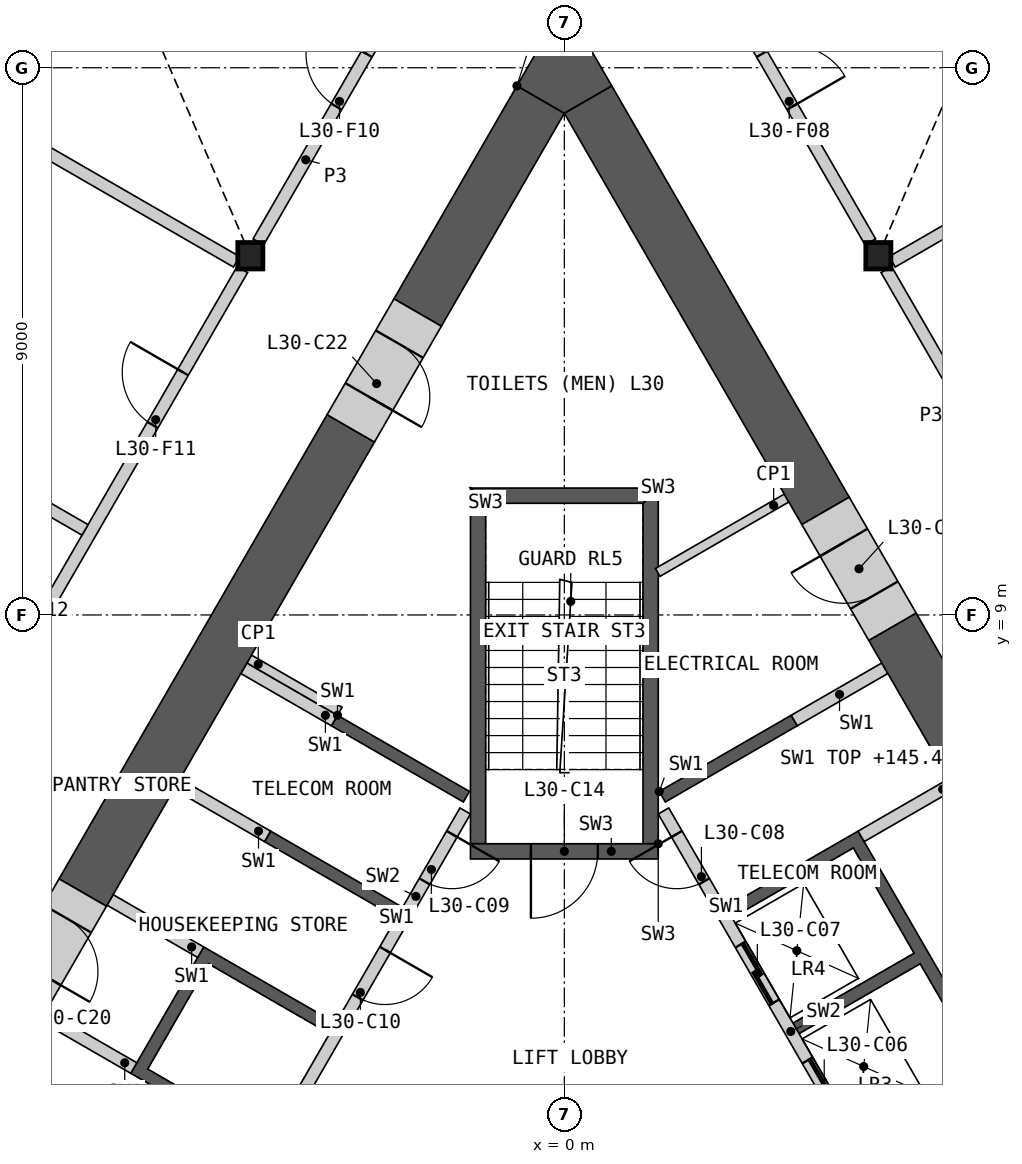
"""IFC4 building model, lengths in metres.
Left out: names, types, materials, properties, quantities, classifications, styles, units other than length and angle.
Written with IfcOpenShell. Run it as: python <this file> out.ifc"""

import sys

from ifc_helpers import new_model, si_unit, direction, frame, frame_2d, origin, origin_2d, place, context, subcontext, project, spatial, polyline, rectangle, i_section, outline, extrude, element, fill, save


model = new_model("IFC4")
c1 = context("Model", 3, precision=1e-05, world=origin(), true_north=direction((0.0, 1.0)))
c2 = subcontext(c1, "Body", "Model", "MODEL_VIEW")
j1 = project(units=[si_unit("LENGTHUNIT", "METRE"), si_unit("PLANEANGLEUNIT", "RADIAN")], contexts=[c1])
p1 = place(None, origin())
s1 = spatial("IfcSite", under=j1, at=p1, CompositionType="ELEMENT")
p2 = place(p1, origin())
s2 = spatial("IfcBuilding", under=s1, at=p2, CompositionType="ELEMENT")
p3 = place(p2, frame((0.0, 0.0, 141.6)))
s3 = spatial("IfcBuildingStorey", under=s2, at=p3, CompositionType="ELEMENT", Elevation=141.6)
for number, where, z_axis, x_axis in (
    (1, (-5.164, 14.908, 0.0), (0.0, 0.0, 1.0), (1.0, 0.0, 0.0)),
    (2, (5.164, 14.908, 0.0), (0.0, 0.0, 1.0), (1.0, 0.0, 0.0)),
):
    element("IfcColumn", number, at=place(p3, frame(where, z_axis=z_axis, x_axis=x_axis)), inside=s3, PredefinedType="COLUMN", context=c2, shape_type="SweptSolid", body=[
        extrude(i_section(OverallWidth=0.412, OverallDepth=0.435, WebThickness=0.036, FlangeThickness=0.057, at=origin_2d()), origin(), (0.0, 0.0, 1.0), 4.2),
    ])
p4 = place(p3, origin())
e3 = element("IfcWall", 3, at=p4, inside=s3, PredefinedType="SHEAR", context=c2, shape_type="SweptSolid", body=[
    extrude(outline(polyline([(1.561, 6.097), (3.731, 7.35), (3.831, 7.177), (1.66, 5.924), (1.561, 6.097)])), origin(), (0.0, 0.0, 1.0), 3.8),
])
p5 = place(p3, origin())
e4 = element("IfcWall", 4, at=p5, inside=s3, PredefinedType="SHEAR", context=c2, shape_type="SweptSolid", body=[
    extrude(outline(polyline([(2.66, 4.192), (4.831, 5.445), (8.231, -0.444), (6.061, -1.697), (5.96, -1.524), (7.952, -0.374), (6.952, 1.358), (4.96, 0.208), (4.861, 0.381), (6.852, 1.531), (5.852, 3.263), (3.861, 2.113), (3.76, 2.287), (5.752, 3.437), (4.752, 5.169), (2.76, 4.019), (2.66, 4.192)])), origin(), (0.0, 0.0, 1.0), 3.8),
])
p6 = place(p3, frame((5.817, -1.476, 0.0), z_axis=(0.0, 0.0, 1.0), x_axis=(-0.500002616675, 0.866023893041, 0.0)))
e5 = element("IfcWall", 5, at=p6, inside=s3, PredefinedType="SOLIDWALL", context=c2, shape_type="SweptSolid", body=[
    extrude(rectangle(XDim=8.373, YDim=0.2, at=frame_2d((4.187, 0.0))), origin(), (0.0, 0.0, 1.0), 3.8),
])
p7 = place(p6, frame((0.337, 0.0, 0.0)))
e6 = element("IfcOpeningElement", 6, at=p7, cuts=e5, PredefinedType="OPENING", context=c2, shape_type="SweptSolid", body=[
    extrude(rectangle(XDim=1.1, YDim=2.1, at=frame_2d((0.55, 1.05))), frame((0.0, 0.11, 0.0), z_axis=(0.0, -1.0, 0.0), x_axis=(1.0, 0.0, 0.0)), (0.0, 0.0, 1.0), 0.22),
])
p8 = place(p6, frame((2.537, 0.0, 0.0)))
e7 = element("IfcOpeningElement", 7, at=p8, cuts=e5, PredefinedType="OPENING", context=c2, shape_type="SweptSolid", body=[
    extrude(rectangle(XDim=1.1, YDim=2.1, at=frame_2d((0.55, 1.05))), frame((0.0, 0.11, 0.0), z_axis=(0.0, -1.0, 0.0), x_axis=(1.0, 0.0, 0.0)), (0.0, 0.0, 1.0), 0.22),
])
p9 = place(p6, frame((4.737, 0.0, 0.0)))
e8 = element("IfcOpeningElement", 8, at=p9, cuts=e5, PredefinedType="OPENING", context=c2, shape_type="SweptSolid", body=[
    extrude(rectangle(XDim=1.1, YDim=2.1, at=frame_2d((0.55, 1.05))), frame((0.0, 0.11, 0.0), z_axis=(0.0, -1.0, 0.0), x_axis=(1.0, 0.0, 0.0)), (0.0, 0.0, 1.0), 0.22),
])
p10 = place(p6, frame((7.037, 0.0, 0.0)))
e9 = element("IfcOpeningElement", 9, at=p10, cuts=e5, PredefinedType="OPENING", context=c2, shape_type="SweptSolid", body=[
    extrude(rectangle(XDim=0.9, YDim=2.1, at=frame_2d((0.45, 1.05))), frame((0.0, 0.11, 0.0), z_axis=(0.0, -1.0, 0.0), x_axis=(1.0, 0.0, 0.0)), (0.0, 0.0, 1.0), 0.22),
])
for number, where, z_axis, x_axis in (
    (10, (4.881, 5.358, 0.0), (0.0, 0.0, 1.0), (0.866, 0.5, 0.0)),
    (11, (3.781, 7.263, 0.0), (0.0, 0.0, 1.0), (0.866, 0.5, 0.0)),
):
    element("IfcWall", number, at=place(p3, frame(where, z_axis=z_axis, x_axis=x_axis)), inside=s3, PredefinedType="SHEAR", context=c2, shape_type="SweptSolid", body=[
        extrude(rectangle(XDim=1.72, YDim=0.2, at=frame_2d((0.86, 0.0))), origin(), (0.0, 0.0, 1.0), 3.8),
    ])
p11 = place(p3, origin())
e12 = element("IfcWall", 12, at=p11, inside=s3, PredefinedType="SHEAR", context=c2, shape_type="SweptSolid", body=[
    extrude(outline(polyline([(-4.96, 0.208), (-7.131, 1.461), (-5.931, 3.54), (-3.76, 2.287), (-3.861, 2.113), (-5.852, 3.263), (-6.852, 1.531), (-4.861, 0.381), (-4.96, 0.208)])), origin(), (0.0, 0.0, 1.0), 3.8),
])
p12 = place(p3, origin())
e13 = element("IfcWall", 13, at=p12, inside=s3, PredefinedType="SHEAR", context=c2, shape_type="SweptSolid", body=[
    extrude(outline(polyline([(-2.76, 4.019), (-4.931, 5.272), (-4.831, 5.445), (-2.66, 4.192), (-2.76, 4.019)])), origin(), (0.0, 0.0, 1.0), 3.8),
])
p13 = place(p3, origin())
e14 = element("IfcWall", 14, at=p13, inside=s3, PredefinedType="SHEAR", context=c2, shape_type="SweptSolid", body=[
    extrude(outline(polyline([(-3.731, 7.35), (-1.561, 6.097), (-1.66, 5.924), (-3.831, 7.177), (-3.731, 7.35)])), origin(), (0.0, 0.0, 1.0), 3.8),
])
p14 = place(p3, frame((-1.631, 5.776, 0.0), z_axis=(0.0, 0.0, 1.0), x_axis=(-0.499992876559, -0.866029516466, 0.0)))
e15 = element("IfcWall", 15, at=p14, inside=s3, PredefinedType="SOLIDWALL", context=c2, shape_type="SweptSolid", body=[
    extrude(rectangle(XDim=6.486, YDim=0.2, at=frame_2d((3.243, 0.0))), origin(), (0.0, 0.0, 1.0), 3.8),
])
p15 = place(p14, frame((0.437, 0.0, 0.0)))
e16 = element("IfcOpeningElement", 16, at=p15, cuts=e15, PredefinedType="OPENING", context=c2, shape_type="SweptSolid", body=[
    extrude(rectangle(XDim=0.9, YDim=2.1, at=frame_2d((0.45, 1.05))), frame((0.0, 0.11, 0.0), z_axis=(0.0, -1.0, 0.0), x_axis=(1.0, 0.0, 0.0)), (0.0, 0.0, 1.0), 0.22),
])
p16 = place(p14, frame((2.637, 0.0, 0.0)))
e17 = element("IfcOpeningElement", 17, at=p16, cuts=e15, PredefinedType="OPENING", context=c2, shape_type="SweptSolid", body=[
    extrude(rectangle(XDim=0.9, YDim=2.1, at=frame_2d((0.45, 1.05))), frame((0.0, 0.11, 0.0), z_axis=(0.0, -1.0, 0.0), x_axis=(1.0, 0.0, 0.0)), (0.0, 0.0, 1.0), 0.22),
])
for number, where, z_axis, x_axis in (
    (18, (-3.781, 7.263, 0.0), (0.0, 0.0, 1.0), (-0.866, 0.5, 0.0)),
    (19, (-4.881, 5.358, 0.0), (0.0, 0.0, 1.0), (-0.866, 0.5, 0.0)),
):
    element("IfcWall", number, at=place(p3, frame(where, z_axis=z_axis, x_axis=x_axis)), inside=s3, PredefinedType="SHEAR", context=c2, shape_type="SweptSolid", body=[
        extrude(rectangle(XDim=1.72, YDim=0.2, at=frame_2d((0.86, 0.0))), origin(), (0.0, 0.0, 1.0), 3.8),
    ])
p17 = place(p3, frame((-5.981, 3.453, 0.0), z_axis=(0.0, 0.0, 1.0), x_axis=(-0.866060346521, 0.499939472521, 0.0)))
e20 = element("IfcWall", 20, at=p17, inside=s3, PredefinedType="SHEAR", context=c2, shape_type="SweptSolid", body=[
    extrude(rectangle(XDim=1.72, YDim=0.2, at=frame_2d((0.86, 0.0))), origin(), (0.0, 0.0, 1.0), 3.8),
])
p18 = place(p3, frame((-7.081, 1.548, 0.0), z_axis=(0.0, 0.0, 1.0), x_axis=(-0.865963414263, 0.500107353632, 0.0)))
e21 = element("IfcWall", 21, at=p18, inside=s3, PredefinedType="SHEAR", context=c2, shape_type="SweptSolid", body=[
    extrude(rectangle(XDim=1.72, YDim=0.2, at=frame_2d((0.86, 0.0))), origin(), (0.0, 0.0, 1.0), 3.8),
])
p19 = place(p3, origin())
e22 = element("IfcWall", 22, at=p19, inside=s3, PredefinedType="SHEAR", context=c2, shape_type="SweptSolid", body=[
    extrude(outline(polyline([(1.544, 5.237), (1.544, 11.087), (1.294, 10.837), (1.294, 5.237), (1.544, 5.237)])), origin(), (0.0, 0.0, 1.0), 3.8),
])
p20 = place(p3, origin())
e23 = element("IfcWall", 23, at=p20, inside=s3, PredefinedType="SHEAR", context=c2, shape_type="SweptSolid", body=[
    extrude(outline(polyline([(1.544, 11.087), (-1.544, 11.087), (-1.294, 10.837), (1.294, 10.837), (1.544, 11.087)])), origin(), (0.0, 0.0, 1.0), 3.8),
])
p21 = place(p3, origin())
e24 = element("IfcWall", 24, at=p21, inside=s3, PredefinedType="SHEAR", context=c2, shape_type="SweptSolid", body=[
    extrude(outline(polyline([(-1.294, 10.837), (-1.544, 11.087), (-1.544, 5.237), (-1.294, 5.237), (-1.294, 10.837)])), origin(), (0.0, 0.0, 1.0), 3.8),
])
p22 = place(p3, frame((1.544, 5.112, 0.0), z_axis=(0.0, 0.0, 1.0), x_axis=(-1.0, 0.0, 0.0)))
e25 = element("IfcWall", 25, at=p22, inside=s3, PredefinedType="SHEAR", context=c2, shape_type="SweptSolid", body=[
    extrude(rectangle(XDim=3.088, YDim=0.25, at=frame_2d((1.544, 0.0))), origin(), (0.0, 0.0, 1.0), 3.8),
])
p23 = place(p22, frame((0.994, 0.0, 0.0)))
e26 = element("IfcOpeningElement", 26, at=p23, cuts=e25, PredefinedType="OPENING", context=c2, shape_type="SweptSolid", body=[
    extrude(rectangle(XDim=1.1, YDim=2.1, at=frame_2d((0.55, 1.05))), frame((0.0, 0.135, 0.0), z_axis=(0.0, -1.0, 0.0), x_axis=(1.0, 0.0, 0.0)), (0.0, 0.0, 1.0), 0.27),
])
p24 = place(p3, frame((-3.693, 7.415, 0.0), z_axis=(0.0, 0.0, 1.0), x_axis=(-0.866024871741, 0.500000921525, 0.0)))
e27 = element("IfcWall", 27, at=p24, inside=s3, PredefinedType="PARTITIONING", context=c2, shape_type="SweptSolid", body=[
    extrude(rectangle(XDim=1.72, YDim=0.15, at=frame_2d((0.86, 0.0))), origin(), (0.0, 0.0, 1.0), 3.8),
])
p25 = place(p3, frame((3.654, 10.923, 0.0), z_axis=(0.0, 0.0, 1.0), x_axis=(-0.865974546186, -0.5000880776, 0.0)))
e28 = element("IfcWall", 28, at=p25, inside=s3, PredefinedType="PARTITIONING", context=c2, shape_type="SweptSolid", body=[
    extrude(rectangle(XDim=2.447, YDim=0.15, at=frame_2d((1.223, 0.0))), origin(), (0.0, 0.0, 1.0), 3.8),
])
p26 = place(p3, frame((10.521, -0.07, 0.0), z_axis=(0.0, 0.0, 1.0), x_axis=(-0.499997384719, 0.866026913713, 0.0)))
e29 = element("IfcWall", 29, at=p26, inside=s3, PredefinedType="SHEAR", context=c2, shape_type="SweptSolid", body=[
    extrude(rectangle(XDim=10.249, YDim=0.9, at=frame_2d((5.125, 0.0))), origin(), (0.0, 0.0, 1.0), 3.8),
])
p27 = place(p3, frame((4.296, 10.712, 0.0), z_axis=(0.0, 0.0, 1.0), x_axis=(-0.500011000363, 0.866019052629, 0.0)))
e30 = element("IfcWall", 30, at=p27, inside=s3, PredefinedType="SHEAR", context=c2, shape_type="SweptSolid", body=[
    extrude(rectangle(XDim=7.812, YDim=0.9, at=frame_2d((3.906, 0.0))), origin(), (0.0, 0.0, 1.0), 3.8),
])
p28 = place(p3, frame((-3.512, 12.069, 0.0), z_axis=(0.0, 0.0, 1.0), x_axis=(-0.500002126466, -0.866024176065, 0.0)))
e31 = element("IfcWall", 31, at=p28, inside=s3, PredefinedType="SHEAR", context=c2, shape_type="SweptSolid", body=[
    extrude(rectangle(XDim=8.816, YDim=0.9, at=frame_2d((4.408, 0.0))), origin(), (0.0, 0.0, 1.0), 3.8),
])
p29 = place(p3, frame((-0.39, 17.478, 0.0), z_axis=(0.0, 0.0, 1.0), x_axis=(-0.500046330384, -0.865998653272, 0.0)))
e32 = element("IfcWall", 32, at=p29, inside=s3, PredefinedType="SHEAR", context=c2, shape_type="SweptSolid", body=[
    extrude(rectangle(XDim=4.045, YDim=0.9, at=frame_2d((2.023, 0.0))), origin(), (0.0, 0.0, 1.0), 3.8),
])
p30 = place(p3, origin())
e33 = element("IfcWall", 33, at=p30, inside=s3, PredefinedType="SHEAR", context=c2, shape_type="SweptSolid", body=[
    extrude(outline(polyline([(-0.779, 17.703), (0.0, 19.052), (0.779, 17.703), (0.0, 17.253), (-0.779, 17.703)])), origin(), (0.0, 0.0, 1.0), 3.8),
])
p31 = place(p3, frame((-7.92, 4.434, 0.0), z_axis=(0.0, 0.0, 1.0), x_axis=(-0.499939227269, -0.866060488094, 0.0)))
e34 = element("IfcWall", 34, at=p31, inside=s3, PredefinedType="SHEAR", context=c2, shape_type="SweptSolid", body=[
    extrude(rectangle(XDim=2.08, YDim=0.9, at=frame_2d((1.04, 0.0))), origin(), (0.0, 0.0, 1.0), 3.8),
])
p32 = place(p31, frame((0.5, 0.0, 0.0)))
e35 = element("IfcOpeningElement", 35, at=p32, cuts=e34, PredefinedType="OPENING", context=c2, shape_type="SweptSolid", body=[
    extrude(rectangle(XDim=1.0, YDim=2.1, at=frame_2d((0.5, 1.05))), frame((0.0, 0.46, 0.0), z_axis=(0.0, -1.0, 0.0), x_axis=(1.0, 0.0, 0.0)), (0.0, 0.0, 1.0), 0.92),
])
p33 = place(p3, frame((5.396, 8.806, 0.0), z_axis=(0.0, 0.0, 1.0), x_axis=(-0.499981787252, 0.866035918664, 0.0)))
e36 = element("IfcWall", 36, at=p33, inside=s3, PredefinedType="SHEAR", context=c2, shape_type="SweptSolid", body=[
    extrude(rectangle(XDim=2.2, YDim=0.9, at=frame_2d((1.1, 0.0))), origin(), (0.0, 0.0, 1.0), 3.8),
])
p34 = place(p33, frame((0.6, 0.0, 0.0)))
e37 = element("IfcOpeningElement", 37, at=p34, cuts=e36, PredefinedType="OPENING", context=c2, shape_type="SweptSolid", body=[
    extrude(rectangle(XDim=1.0, YDim=2.1, at=frame_2d((0.5, 1.05))), frame((0.0, 0.46, 0.0), z_axis=(0.0, -1.0, 0.0), x_axis=(1.0, 0.0, 0.0)), (0.0, 0.0, 1.0), 0.92),
])
p35 = place(p3, frame((-2.413, 13.974, 0.0), z_axis=(0.0, 0.0, 1.0), x_axis=(-0.499946605688, -0.86605622881, 0.0)))
e38 = element("IfcWall", 38, at=p35, inside=s3, PredefinedType="SHEAR", context=c2, shape_type="SweptSolid", body=[
    extrude(rectangle(XDim=2.2, YDim=0.9, at=frame_2d((1.1, 0.0))), origin(), (0.0, 0.0, 1.0), 3.8),
])
p36 = place(p35, frame((0.6, 0.0, 0.0)))
e39 = element("IfcOpeningElement", 39, at=p36, cuts=e38, PredefinedType="OPENING", context=c2, shape_type="SweptSolid", body=[
    extrude(rectangle(XDim=1.0, YDim=2.1, at=frame_2d((0.5, 1.05))), frame((0.0, 0.46, 0.0), z_axis=(0.0, -1.0, 0.0), x_axis=(1.0, 0.0, 0.0)), (0.0, 0.0, 1.0), 0.92),
])
p37 = place(p3, frame((5.295, 14.68, 0.0), z_axis=(0.0, 0.0, 1.0), x_axis=(0.500012035596, -0.866018454918, 0.0)))
e40 = element("IfcWall", 40, at=p37, inside=s3, PredefinedType="PARTITIONING", context=c2, shape_type="SweptSolid", body=[
    extrude(rectangle(XDim=9.803, YDim=0.2, at=frame_2d((4.902, 0.0))), origin(), (0.0, 0.0, 1.0), 3.8),
])
p38 = place(p37, frame((4.052, 0.0, 0.0)))
e41 = element("IfcOpeningElement", 41, at=p38, cuts=e40, PredefinedType="OPENING", context=c2, shape_type="SweptSolid", body=[
    extrude(rectangle(XDim=1.8, YDim=2.1, at=frame_2d((0.9, 1.05))), frame((0.0, 0.11, 0.0), z_axis=(0.0, -1.0, 0.0), x_axis=(1.0, 0.0, 0.0)), (0.0, 0.0, 1.0), 0.22),
])
p39 = place(p3, frame((-10.197, 6.19, 0.0), z_axis=(0.0, 0.0, 1.0), x_axis=(0.500012035596, 0.866018454918, 0.0)))
e42 = element("IfcWall", 42, at=p39, inside=s3, PredefinedType="PARTITIONING", context=c2, shape_type="SweptSolid", body=[
    extrude(rectangle(XDim=9.803, YDim=0.2, at=frame_2d((4.902, 0.0))), origin(), (0.0, 0.0, 1.0), 3.8),
])
p40 = place(p39, frame((6.853, 0.0, 0.0)))
e43 = element("IfcOpeningElement", 43, at=p40, cuts=e42, PredefinedType="OPENING", context=c2, shape_type="SweptSolid", body=[
    extrude(rectangle(XDim=1.0, YDim=2.1, at=frame_2d((0.5, 1.05))), frame((0.0, 0.11, 0.0), z_axis=(0.0, -1.0, 0.0), x_axis=(1.0, 0.0, 0.0)), (0.0, 0.0, 1.0), 0.22),
])
p41 = place(p39, frame((1.851, 0.0, 0.0)))
e44 = element("IfcOpeningElement", 44, at=p41, cuts=e42, PredefinedType="OPENING", context=c2, shape_type="SweptSolid", body=[
    extrude(rectangle(XDim=1.0, YDim=2.1, at=frame_2d((0.5, 1.05))), frame((0.0, 0.11, 0.0), z_axis=(0.0, -1.0, 0.0), x_axis=(1.0, 0.0, 0.0)), (0.0, 0.0, 1.0), 0.22),
])
p42 = place(p3, frame((-5.033, 15.135, 0.0), z_axis=(0.0, 0.0, 1.0), x_axis=(0.499980978912, 0.866036385336, 0.0)))
e45 = element("IfcWall", 45, at=p42, inside=s3, PredefinedType="PARTITIONING", context=c2, shape_type="SweptSolid", body=[
    extrude(rectangle(XDim=6.24, YDim=0.2, at=frame_2d((3.12, 0.0))), origin(), (0.0, 0.0, 1.0), 3.8),
])
p43 = place(p42, frame((2.57, 0.0, 0.0)))
e46 = element("IfcOpeningElement", 46, at=p43, cuts=e45, PredefinedType="OPENING", context=c2, shape_type="SweptSolid", body=[
    extrude(rectangle(XDim=1.0, YDim=2.1, at=frame_2d((0.5, 1.05))), frame((0.0, 0.11, 0.0), z_axis=(0.0, -1.0, 0.0), x_axis=(1.0, 0.0, 0.0)), (0.0, 0.0, 1.0), 0.22),
])
p44 = place(p3, frame((1.913, 20.539, 0.0), z_axis=(0.0, 0.0, 1.0), x_axis=(0.499980978912, -0.866036385336, 0.0)))
e47 = element("IfcWall", 47, at=p44, inside=s3, PredefinedType="PARTITIONING", context=c2, shape_type="SweptSolid", body=[
    extrude(rectangle(XDim=6.24, YDim=0.2, at=frame_2d((3.12, 0.0))), origin(), (0.0, 0.0, 1.0), 3.8),
])
p45 = place(p44, frame((2.67, 0.0, 0.0)))
e48 = element("IfcOpeningElement", 48, at=p45, cuts=e47, PredefinedType="OPENING", context=c2, shape_type="SweptSolid", body=[
    extrude(rectangle(XDim=1.0, YDim=2.1, at=frame_2d((0.5, 1.05))), frame((0.0, 0.11, 0.0), z_axis=(0.0, -1.0, 0.0), x_axis=(1.0, 0.0, 0.0)), (0.0, 0.0, 1.0), 0.22),
])
for number, where, z_axis, x_axis in (
    (49, (5.392, 14.809, 0.0), (0.0, 0.0, 1.0), (0.866, 0.5, 0.0)),
    (50, (-16.436, 21.186, 0.0), (0.0, 0.0, 1.0), (0.866, -0.5, 0.0)),
):
    element("IfcWall", number, at=place(p3, frame(where, z_axis=z_axis, x_axis=x_axis)), inside=s3, PredefinedType="PARTITIONING", context=c2, shape_type="SweptSolid", body=[
        extrude(rectangle(XDim=12.753, YDim=0.2, at=frame_2d((6.377, 0.0))), origin(), (0.0, 0.0, 1.0), 2.885),
    ])
p46 = place(p3, frame((-15.01, 14.514, 0.0), z_axis=(0.0, 0.0, 1.0), x_axis=(0.866018103232, -0.500012644715, 0.0)))
e51 = element("IfcWall", 51, at=p46, inside=s3, PredefinedType="PARTITIONING", context=c2, shape_type="SweptSolid", body=[
    extrude(rectangle(XDim=8.229, YDim=0.2, at=frame_2d((4.115, 0.0))), origin(), (0.0, 0.0, 1.0), 2.885),
])
p47 = place(p8, origin())
e52 = element("IfcDoor", 52, at=p47, inside=s3, OperationType="SLIDING_TO_LEFT", PredefinedType="DOOR", context=c2, shape_type="SweptSolid", body=[
    extrude(rectangle(XDim=1.1, YDim=2.1, at=frame_2d((0.55, 1.05))), frame((0.0, 0.025, 0.0), z_axis=(0.0, -1.0, 0.0), x_axis=(1.0, 0.0, 0.0)), (0.0, 0.0, 1.0), 0.05),
])
fill(e7, e52)
p48 = place(p9, origin())
e53 = element("IfcDoor", 53, at=p48, inside=s3, OperationType="SLIDING_TO_LEFT", PredefinedType="DOOR", context=c2, shape_type="SweptSolid", body=[
    extrude(rectangle(XDim=1.1, YDim=2.1, at=frame_2d((0.55, 1.05))), frame((0.0, 0.025, 0.0), z_axis=(0.0, -1.0, 0.0), x_axis=(1.0, 0.0, 0.0)), (0.0, 0.0, 1.0), 0.05),
])
fill(e8, e53)
p49 = place(p10, origin())
e54 = element("IfcDoor", 54, at=p49, inside=s3, OperationType="SINGLE_SWING_RIGHT", PredefinedType="DOOR", context=c2, shape_type="SweptSolid", body=[
    extrude(rectangle(XDim=0.9, YDim=2.1, at=frame_2d((0.45, 1.05))), frame((0.0, 0.025, 0.0), z_axis=(0.0, -1.0, 0.0), x_axis=(1.0, 0.0, 0.0)), (0.0, 0.0, 1.0), 0.05),
])
fill(e9, e54)
p50 = place(p15, origin())
e55 = element("IfcDoor", 55, at=p50, inside=s3, OperationType="SINGLE_SWING_LEFT", PredefinedType="DOOR", context=c2, shape_type="SweptSolid", body=[
    extrude(rectangle(XDim=0.9, YDim=2.1, at=frame_2d((0.45, 1.05))), frame((0.0, 0.025, 0.0), z_axis=(0.0, -1.0, 0.0), x_axis=(1.0, 0.0, 0.0)), (0.0, 0.0, 1.0), 0.05),
])
fill(e16, e55)
p51 = place(p16, origin())
e56 = element("IfcDoor", 56, at=p51, inside=s3, OperationType="SINGLE_SWING_LEFT", PredefinedType="DOOR", context=c2, shape_type="SweptSolid", body=[
    extrude(rectangle(XDim=0.9, YDim=2.1, at=frame_2d((0.45, 1.05))), frame((0.0, 0.025, 0.0), z_axis=(0.0, -1.0, 0.0), x_axis=(1.0, 0.0, 0.0)), (0.0, 0.0, 1.0), 0.05),
])
fill(e17, e56)
p52 = place(p23, origin())
e57 = element("IfcDoor", 57, at=p52, inside=s3, OperationType="SINGLE_SWING_RIGHT", PredefinedType="DOOR", context=c2, shape_type="SweptSolid", body=[
    extrude(rectangle(XDim=1.1, YDim=2.1, at=frame_2d((0.55, 1.05))), frame((0.0, 0.025, 0.0), z_axis=(0.0, -1.0, 0.0), x_axis=(1.0, 0.0, 0.0)), (0.0, 0.0, 1.0), 0.05),
])
fill(e26, e57)
p53 = place(p32, origin())
e58 = element("IfcDoor", 58, at=p53, inside=s3, OperationType="SINGLE_SWING_RIGHT", PredefinedType="DOOR", context=c2, shape_type="SweptSolid", body=[
    extrude(rectangle(XDim=1.0, YDim=2.1, at=frame_2d((0.5, 1.05))), frame((0.0, 0.205, 0.0), z_axis=(0.0, -1.0, 0.0), x_axis=(1.0, 0.0, 0.0)), (0.0, 0.0, 1.0), 0.05),
])
fill(e35, e58)
p54 = place(p34, origin())
e59 = element("IfcDoor", 59, at=p54, inside=s3, OperationType="SINGLE_SWING_RIGHT", PredefinedType="DOOR", context=c2, shape_type="SweptSolid", body=[
    extrude(rectangle(XDim=1.0, YDim=2.1, at=frame_2d((0.5, 1.05))), frame((0.0, 0.205, 0.0), z_axis=(0.0, -1.0, 0.0), x_axis=(1.0, 0.0, 0.0)), (0.0, 0.0, 1.0), 0.05),
])
fill(e37, e59)
p55 = place(p36, origin())
e60 = element("IfcDoor", 60, at=p55, inside=s3, OperationType="SINGLE_SWING_RIGHT", PredefinedType="DOOR", context=c2, shape_type="SweptSolid", body=[
    extrude(rectangle(XDim=1.0, YDim=2.1, at=frame_2d((0.5, 1.05))), frame((0.0, 0.205, 0.0), z_axis=(0.0, -1.0, 0.0), x_axis=(1.0, 0.0, 0.0)), (0.0, 0.0, 1.0), 0.05),
])
fill(e39, e60)
p56 = place(p45, origin())
e61 = element("IfcDoor", 61, at=p56, inside=s3, OperationType="SINGLE_SWING_RIGHT", PredefinedType="DOOR", context=c2, shape_type="SweptSolid", body=[
    extrude(rectangle(XDim=1.0, YDim=2.1, at=frame_2d((0.5, 1.05))), frame((0.0, 0.025, 0.0), z_axis=(0.0, -1.0, 0.0), x_axis=(1.0, 0.0, 0.0)), (0.0, 0.0, 1.0), 0.05),
])
fill(e48, e61)
p57 = place(p43, origin())
e62 = element("IfcDoor", 62, at=p57, inside=s3, OperationType="SINGLE_SWING_RIGHT", PredefinedType="DOOR", context=c2, shape_type="SweptSolid", body=[
    extrude(rectangle(XDim=1.0, YDim=2.1, at=frame_2d((0.5, 1.05))), frame((0.0, 0.025, 0.0), z_axis=(0.0, -1.0, 0.0), x_axis=(1.0, 0.0, 0.0)), (0.0, 0.0, 1.0), 0.05),
])
fill(e46, e62)
p58 = place(p40, origin())
e63 = element("IfcDoor", 63, at=p58, inside=s3, OperationType="SINGLE_SWING_RIGHT", PredefinedType="DOOR", context=c2, shape_type="SweptSolid", body=[
    extrude(rectangle(XDim=1.0, YDim=2.1, at=frame_2d((0.5, 1.05))), frame((0.0, 0.025, 0.0), z_axis=(0.0, -1.0, 0.0), x_axis=(1.0, 0.0, 0.0)), (0.0, 0.0, 1.0), 0.05),
])
fill(e43, e63)
save(model, sys.argv[1])
